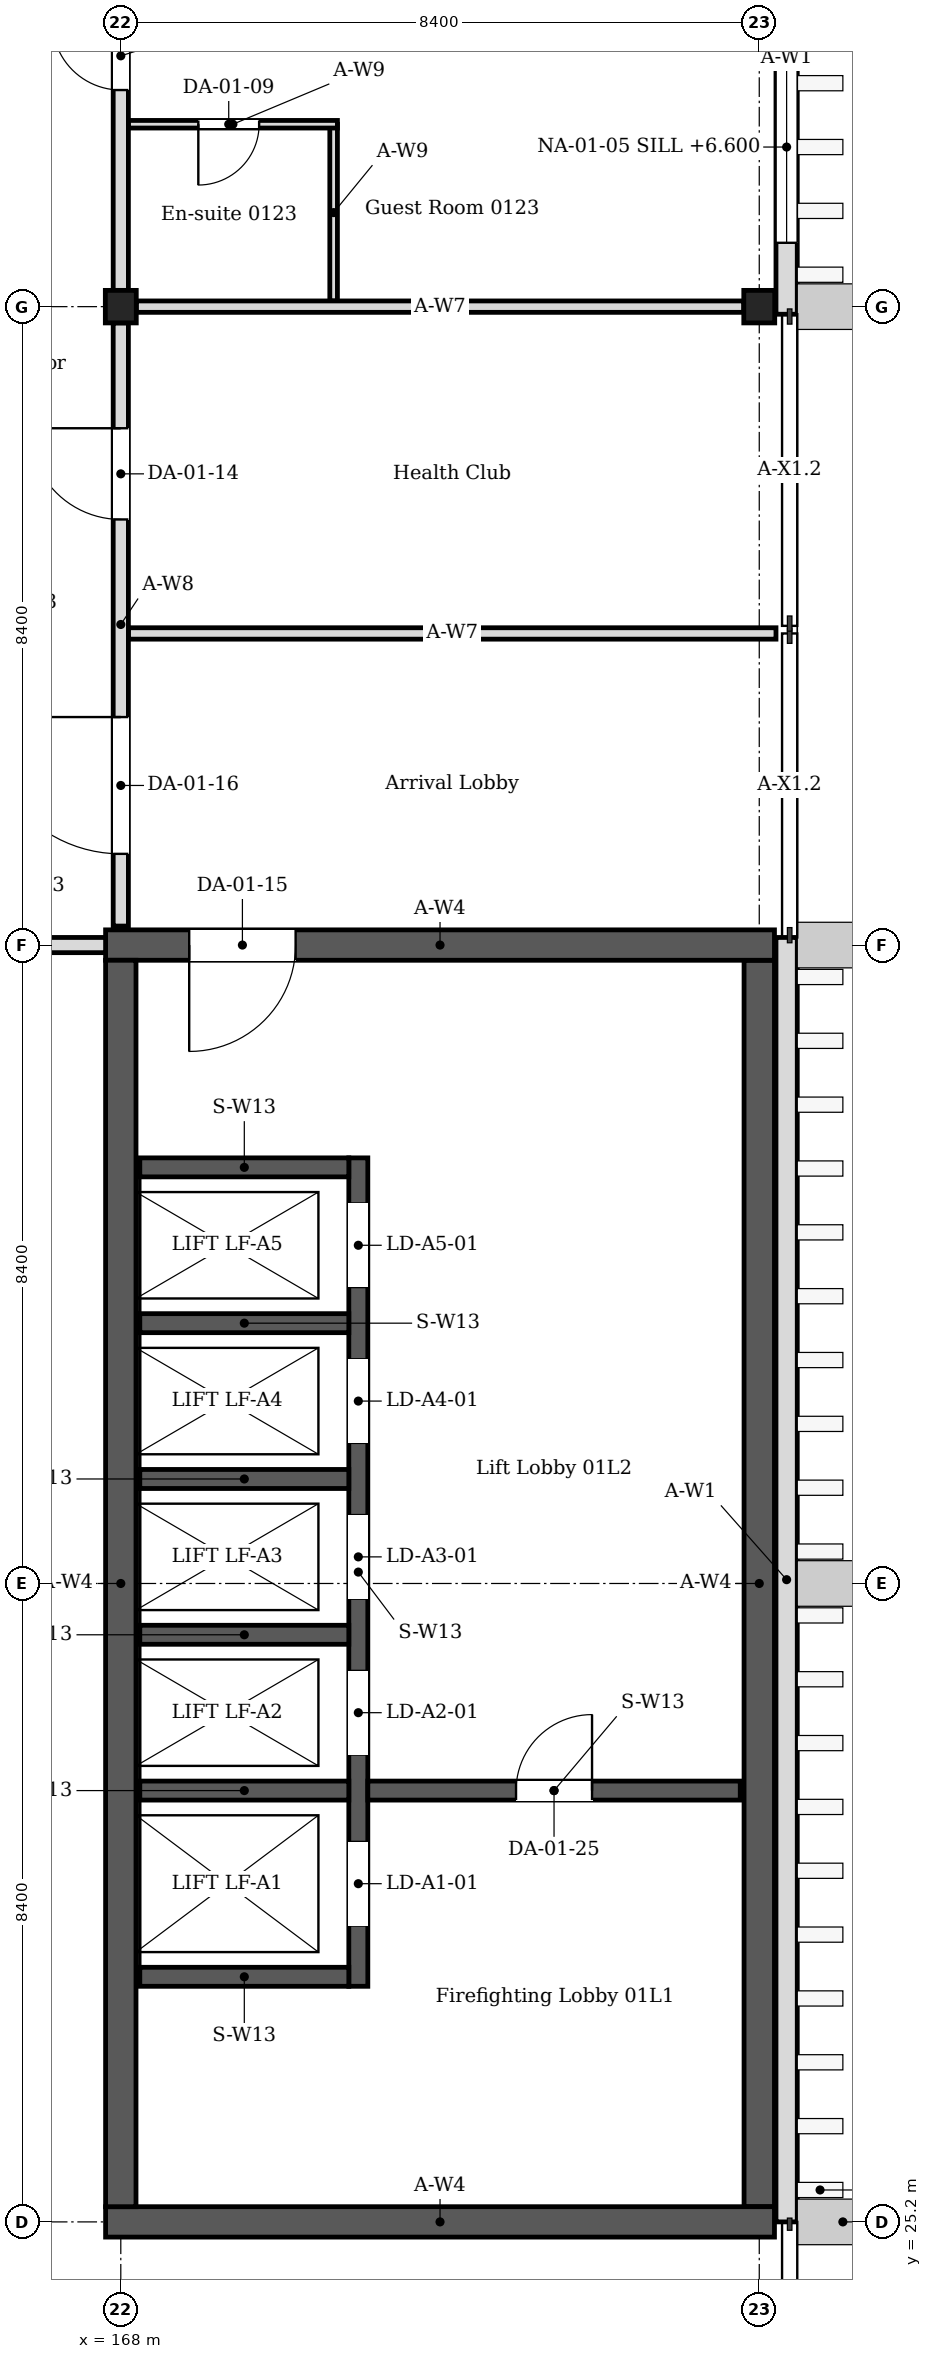
"""IFC4 building model, lengths in metres.
Left out: names, types, materials, properties, quantities, classifications, styles, units other than length and angle.
Written with IfcOpenShell. Run it as: python <this file> out.ifc"""

import sys

from ifc_helpers import new_model, si_unit, direction, frame, frame_2d, origin, origin_2d, place, context, subcontext, project, spatial, rectangle, i_section, extrude, element, fill, save


model = new_model("IFC4")
c1 = context("Model", 3, precision=1e-05, world=origin(), true_north=direction((0.0, 1.0)))
c2 = subcontext(c1, "Body", "Model", "MODEL_VIEW")
j1 = project(units=[si_unit("LENGTHUNIT", "METRE"), si_unit("PLANEANGLEUNIT", "RADIAN")], contexts=[c1])
p1 = place(None, origin())
s1 = spatial("IfcSite", under=j1, at=p1, CompositionType="ELEMENT")
p2 = place(p1, origin())
s2 = spatial("IfcBuilding", under=s1, at=p2, CompositionType="ELEMENT")
p3 = place(p2, frame((0.0, 0.0, 6.0)))
s3 = spatial("IfcBuildingStorey", under=s2, at=p3, CompositionType="ELEMENT", Elevation=6.0)
for number, where, z_axis, x_axis in (
    (1, (168.0, 50.4, 0.0), (0.0, 0.0, 1.0), (1.0, 0.0, 0.0)),
    (2, (176.4, 50.4, 0.0), (0.0, 0.0, 1.0), (1.0, 0.0, 0.0)),
):
    element("IfcColumn", number, at=place(p3, frame(where, z_axis=z_axis, x_axis=x_axis)), inside=s3, PredefinedType="COLUMN", context=c2, shape_type="SweptSolid", body=[
        extrude(i_section(OverallWidth=0.407, OverallDepth=0.428, WebThickness=0.02, FlangeThickness=0.035, FilletRadius=0.022, at=origin_2d()), origin(), (0.0, 0.0, 1.0), 4.2),
    ])
p4 = place(p3, frame((167.8, 25.2, 0.0), z_axis=(0.0, 0.0, 1.0), x_axis=(1.0, 0.0, 0.0)))
e3 = element("IfcWall", 3, at=p4, inside=s3, PredefinedType="SOLIDWALL", context=c2, shape_type="SweptSolid", body=[
    extrude(rectangle(XDim=8.8, YDim=0.4, at=frame_2d((4.4, 0.0))), origin(), (0.0, 0.0, 1.0), 4.05),
])
p5 = place(p3, frame((167.8, 42.0, 0.0), z_axis=(0.0, 0.0, 1.0), x_axis=(1.0, 0.0, 0.0)))
e4 = element("IfcWall", 4, at=p5, inside=s3, PredefinedType="SOLIDWALL", context=c2, shape_type="SweptSolid", body=[
    extrude(rectangle(XDim=8.8, YDim=0.4, at=frame_2d((4.4, 0.0))), origin(), (0.0, 0.0, 1.0), 4.05),
])
p6 = place(p5, frame((1.1, 0.0, 0.0)))
e5 = element("IfcOpeningElement", 5, at=p6, cuts=e4, PredefinedType="OPENING", context=c2, shape_type="SweptSolid", body=[
    extrude(rectangle(XDim=1.4, YDim=2.1, at=frame_2d((0.7, 1.05))), frame((0.0, 0.21, 0.0), z_axis=(0.0, -1.0, 0.0), x_axis=(1.0, 0.0, 0.0)), (0.0, 0.0, 1.0), 0.42),
])
for number, where, z_axis, x_axis in (
    (6, (168.0, 25.4, 0.0), (0.0, 0.0, 1.0), (0.0, 1.0, 0.0)),
    (7, (176.4, 25.4, 0.0), (0.0, 0.0, 1.0), (0.0, 1.0, 0.0)),
):
    element("IfcWall", number, at=place(p3, frame(where, z_axis=z_axis, x_axis=x_axis)), inside=s3, PredefinedType="SOLIDWALL", context=c2, shape_type="SweptSolid", body=[
        extrude(rectangle(XDim=16.4, YDim=0.4, at=frame_2d((8.2, 0.0))), origin(), (0.0, 0.0, 1.0), 4.05),
    ])
p7 = place(p3, frame((176.76, 50.3, 0.0), z_axis=(0.0, 0.0, 1.0), x_axis=(0.0, 1.0, 0.0)))
e8 = element("IfcWall", 8, at=p7, inside=s3, PredefinedType="SOLIDWALL", context=c2, shape_type="SweptSolid", body=[
    extrude(rectangle(XDim=17.12, YDim=0.28, at=frame_2d((8.56, 0.0))), origin(), (0.0, 0.0, 1.0), 4.05),
])
p8 = place(p7, frame((0.94, 0.0, 0.6)))
e9 = element("IfcOpeningElement", 9, at=p8, cuts=e8, PredefinedType="OPENING", context=c2, shape_type="SweptSolid", body=[
    extrude(rectangle(XDim=2.52, YDim=2.4, at=frame_2d((1.26, 1.2))), frame((0.0, 0.15, 0.0), z_axis=(0.0, -1.0, 0.0), x_axis=(1.0, 0.0, 0.0)), (0.0, 0.0, 1.0), 0.3),
])
p9 = place(p7, frame((5.14, 0.0, 0.6)))
e10 = element("IfcOpeningElement", 10, at=p9, cuts=e8, PredefinedType="OPENING", context=c2, shape_type="SweptSolid", body=[
    extrude(rectangle(XDim=2.52, YDim=2.4, at=frame_2d((1.26, 1.2))), frame((0.0, 0.15, 0.0), z_axis=(0.0, -1.0, 0.0), x_axis=(1.0, 0.0, 0.0)), (0.0, 0.0, 1.0), 0.3),
])
p10 = place(p3, frame((176.76, 25.2, 0.0), z_axis=(0.0, 0.0, 1.0), x_axis=(0.0, 1.0, 0.0)))
e11 = element("IfcWall", 11, at=p10, inside=s3, PredefinedType="SOLIDWALL", context=c2, shape_type="SweptSolid", body=[
    extrude(rectangle(XDim=16.9, YDim=0.28, at=frame_2d((8.45, 0.0))), origin(), (0.0, 0.0, 1.0), 4.05),
])
p11 = place(p3, frame((168.1, 46.1, 0.0), z_axis=(0.0, 0.0, 1.0), x_axis=(1.0, 0.0, 0.0)))
e12 = element("IfcWall", 12, at=p11, inside=s3, PredefinedType="PARTITIONING", context=c2, shape_type="SweptSolid", body=[
    extrude(rectangle(XDim=8.52, YDim=0.15, at=frame_2d((4.26, 0.0))), origin(), (0.0, 0.0, 1.0), 3.604),
])
p12 = place(p3, frame((170.8, 50.475, 0.0), z_axis=(0.0, 0.0, 1.0), x_axis=(0.0, 1.0, 0.0)))
e13 = element("IfcWall", 13, at=p12, inside=s3, PredefinedType="PARTITIONING", context=c2, shape_type="SweptSolid", body=[
    extrude(rectangle(XDim=2.325, YDim=0.1, at=frame_2d((1.163, 0.0))), origin(), (0.0, 0.0, 1.0), 4.05),
])
p13 = place(p3, frame((170.85, 52.8, 0.0), z_axis=(0.0, 0.0, 1.0), x_axis=(-1.0, 0.0, 0.0)))
e14 = element("IfcWall", 14, at=p13, inside=s3, PredefinedType="PARTITIONING", context=c2, shape_type="SweptSolid", body=[
    extrude(rectangle(XDim=2.75, YDim=0.1, at=frame_2d((1.375, 0.0))), origin(), (0.0, 0.0, 1.0), 4.05),
])
p14 = place(p13, frame((1.03, 0.0, 0.0)))
e15 = element("IfcOpeningElement", 15, at=p14, cuts=e14, PredefinedType="OPENING", context=c2, shape_type="SweptSolid", body=[
    extrude(rectangle(XDim=0.8, YDim=2.1, at=frame_2d((0.4, 1.05))), frame((0.0, 0.06, 0.0), z_axis=(0.0, -1.0, 0.0), x_axis=(1.0, 0.0, 0.0)), (0.0, 0.0, 1.0), 0.12),
])
p15 = place(p3, frame((168.204, 50.4, 0.0), z_axis=(0.0, 0.0, 1.0), x_axis=(1.0, 0.0, 0.0)))
e16 = element("IfcWall", 16, at=p15, inside=s3, PredefinedType="PARTITIONING", context=c2, shape_type="SweptSolid", body=[
    extrude(rectangle(XDim=7.993, YDim=0.15, at=frame_2d((3.997, 0.0))), origin(), (0.0, 0.0, 1.0), 3.604),
])
p16 = place(p3, frame((165.803, 42.0, 0.0), z_axis=(0.0, 0.0, 1.0), x_axis=(1.0, 0.0, 0.0)))
e17 = element("IfcWall", 17, at=p16, inside=s3, PredefinedType="PARTITIONING", context=c2, shape_type="SweptSolid", body=[
    extrude(rectangle(XDim=1.997, YDim=0.2, at=frame_2d((0.998, 0.0))), origin(), (0.0, 0.0, 1.0), 3.604),
])
p17 = place(p3, frame((168.0, 42.25, 0.0), z_axis=(0.0, 0.0, 1.0), x_axis=(0.0, 1.0, 0.0)))
e18 = element("IfcWall", 18, at=p17, inside=s3, PredefinedType="PARTITIONING", context=c2, shape_type="SweptSolid", body=[
    extrude(rectangle(XDim=7.936, YDim=0.2, at=frame_2d((3.968, 0.0))), origin(), (0.0, 0.0, 1.0), 3.45),
])
p18 = place(p17, frame((5.35, 0.0, 0.0)))
e19 = element("IfcOpeningElement", 19, at=p18, cuts=e18, PredefinedType="OPENING", context=c2, shape_type="SweptSolid", body=[
    extrude(rectangle(XDim=1.2, YDim=2.1, at=frame_2d((0.6, 1.05))), frame((0.0, 0.11, 0.0), z_axis=(0.0, -1.0, 0.0), x_axis=(1.0, 0.0, 0.0)), (0.0, 0.0, 1.0), 0.22),
])
p19 = place(p17, frame((0.95, 0.0, 0.0)))
e20 = element("IfcOpeningElement", 20, at=p19, cuts=e18, PredefinedType="OPENING", context=c2, shape_type="SweptSolid", body=[
    extrude(rectangle(XDim=1.8, YDim=2.1, at=frame_2d((0.9, 1.05))), frame((0.0, 0.11, 0.0), z_axis=(0.0, -1.0, 0.0), x_axis=(1.0, 0.0, 0.0)), (0.0, 0.0, 1.0), 0.22),
])
p20 = place(p3, frame((168.0, 50.614, 0.0), z_axis=(0.0, 0.0, 1.0), x_axis=(0.0, 1.0, 0.0)))
e21 = element("IfcWall", 21, at=p20, inside=s3, PredefinedType="PARTITIONING", context=c2, shape_type="SweptSolid", body=[
    extrude(rectangle(XDim=7.986, YDim=0.2, at=frame_2d((3.993, 0.0))), origin(), (0.0, 0.0, 1.0), 3.45),
])
p21 = place(p20, frame((2.636, 0.0, 0.0)))
e22 = element("IfcOpeningElement", 22, at=p21, cuts=e21, PredefinedType="OPENING", context=c2, shape_type="SweptSolid", body=[
    extrude(rectangle(XDim=0.9, YDim=2.1, at=frame_2d((0.45, 1.05))), frame((0.0, 0.11, 0.0), z_axis=(0.0, -1.0, 0.0), x_axis=(1.0, 0.0, 0.0)), (0.0, 0.0, 1.0), 0.22),
])
p22 = place(p20, frame((4.436, 0.0, 0.0)))
e23 = element("IfcOpeningElement", 23, at=p22, cuts=e21, PredefinedType="OPENING", context=c2, shape_type="SweptSolid", body=[
    extrude(rectangle(XDim=0.9, YDim=2.1, at=frame_2d((0.45, 1.05))), frame((0.0, 0.11, 0.0), z_axis=(0.0, -1.0, 0.0), x_axis=(1.0, 0.0, 0.0)), (0.0, 0.0, 1.0), 0.22),
])
p23 = place(p3, frame((171.125, 28.3, 0.0), z_axis=(0.0, 0.0, 1.0), x_axis=(0.0, 1.0, 0.0)))
e24 = element("IfcWall", 24, at=p23, inside=s3, PredefinedType="SOLIDWALL", context=c2, shape_type="SweptSolid", body=[
    extrude(rectangle(XDim=10.9, YDim=0.25, at=frame_2d((5.45, 0.0))), origin(), (0.0, 0.0, 1.0), 4.05),
])
p24 = place(p23, frame((0.8, 0.0, 0.0)))
e25 = element("IfcOpeningElement", 25, at=p24, cuts=e24, PredefinedType="OPENING", context=c2, shape_type="SweptSolid", body=[
    extrude(rectangle(XDim=1.1, YDim=2.1, at=frame_2d((0.55, 1.05))), frame((0.0, 0.135, 0.0), z_axis=(0.0, -1.0, 0.0), x_axis=(1.0, 0.0, 0.0)), (0.0, 0.0, 1.0), 0.27),
])
p25 = place(p23, frame((3.05, 0.0, 0.0)))
e26 = element("IfcOpeningElement", 26, at=p25, cuts=e24, PredefinedType="OPENING", context=c2, shape_type="SweptSolid", body=[
    extrude(rectangle(XDim=1.1, YDim=2.1, at=frame_2d((0.55, 1.05))), frame((0.0, 0.135, 0.0), z_axis=(0.0, -1.0, 0.0), x_axis=(1.0, 0.0, 0.0)), (0.0, 0.0, 1.0), 0.27),
])
p26 = place(p23, frame((5.1, 0.0, 0.0)))
e27 = element("IfcOpeningElement", 27, at=p26, cuts=e24, PredefinedType="OPENING", context=c2, shape_type="SweptSolid", body=[
    extrude(rectangle(XDim=1.1, YDim=2.1, at=frame_2d((0.55, 1.05))), frame((0.0, 0.135, 0.0), z_axis=(0.0, -1.0, 0.0), x_axis=(1.0, 0.0, 0.0)), (0.0, 0.0, 1.0), 0.27),
])
p27 = place(p23, frame((7.15, 0.0, 0.0)))
e28 = element("IfcOpeningElement", 28, at=p27, cuts=e24, PredefinedType="OPENING", context=c2, shape_type="SweptSolid", body=[
    extrude(rectangle(XDim=1.1, YDim=2.1, at=frame_2d((0.55, 1.05))), frame((0.0, 0.135, 0.0), z_axis=(0.0, -1.0, 0.0), x_axis=(1.0, 0.0, 0.0)), (0.0, 0.0, 1.0), 0.27),
])
p28 = place(p23, frame((9.2, 0.0, 0.0)))
e29 = element("IfcOpeningElement", 29, at=p28, cuts=e24, PredefinedType="OPENING", context=c2, shape_type="SweptSolid", body=[
    extrude(rectangle(XDim=1.1, YDim=2.1, at=frame_2d((0.55, 1.05))), frame((0.0, 0.135, 0.0), z_axis=(0.0, -1.0, 0.0), x_axis=(1.0, 0.0, 0.0)), (0.0, 0.0, 1.0), 0.27),
])
for number, where, z_axis, x_axis in (
    (30, (168.25, 28.425, 0.0), (0.0, 0.0, 1.0), (1.0, 0.0, 0.0)),
    (31, (168.25, 30.875, 0.0), (0.0, 0.0, 1.0), (1.0, 0.0, 0.0)),
    (32, (168.25, 32.925, 0.0), (0.0, 0.0, 1.0), (1.0, 0.0, 0.0)),
    (33, (168.25, 34.975, 0.0), (0.0, 0.0, 1.0), (1.0, 0.0, 0.0)),
    (34, (168.25, 37.025, 0.0), (0.0, 0.0, 1.0), (1.0, 0.0, 0.0)),
    (35, (168.25, 39.075, 0.0), (0.0, 0.0, 1.0), (1.0, 0.0, 0.0)),
):
    element("IfcWall", number, at=place(p3, frame(where, z_axis=z_axis, x_axis=x_axis)), inside=s3, PredefinedType="SOLIDWALL", context=c2, shape_type="SweptSolid", body=[
        extrude(rectangle(XDim=2.75, YDim=0.25, at=frame_2d((1.375, 0.0))), origin(), (0.0, 0.0, 1.0), 4.05),
    ])
p29 = place(p3, frame((171.25, 30.875, 0.0), z_axis=(0.0, 0.0, 1.0), x_axis=(1.0, 0.0, 0.0)))
e36 = element("IfcWall", 36, at=p29, inside=s3, PredefinedType="SOLIDWALL", context=c2, shape_type="SweptSolid", body=[
    extrude(rectangle(XDim=4.9, YDim=0.25, at=frame_2d((2.45, 0.0))), origin(), (0.0, 0.0, 1.0), 4.05),
])
p30 = place(p29, frame((1.95, 0.0, 0.0)))
e37 = element("IfcOpeningElement", 37, at=p30, cuts=e36, PredefinedType="OPENING", context=c2, shape_type="SweptSolid", body=[
    extrude(rectangle(XDim=1.0, YDim=2.1, at=frame_2d((0.5, 1.05))), frame((0.0, 0.135, 0.0), z_axis=(0.0, -1.0, 0.0), x_axis=(1.0, 0.0, 0.0)), (0.0, 0.0, 1.0), 0.27),
])
p31 = place(p8, origin())
e38 = element("IfcWindow", 38, at=p31, inside=s3, PartitioningType="SINGLE_PANEL", PredefinedType="WINDOW", context=c2, shape_type="SweptSolid", body=[
    extrude(rectangle(XDim=2.52, YDim=2.4, at=frame_2d((1.26, 1.2))), frame((0.0, 0.03, 0.0), z_axis=(0.0, -1.0, 0.0), x_axis=(1.0, 0.0, 0.0)), (0.0, 0.0, 1.0), 0.06),
])
fill(e9, e38)
p32 = place(p14, origin())
e39 = element("IfcDoor", 39, at=p32, inside=s3, OperationType="SINGLE_SWING_RIGHT", PredefinedType="DOOR", context=c2, shape_type="SweptSolid", body=[
    extrude(rectangle(XDim=0.8, YDim=2.1, at=frame_2d((0.4, 1.05))), frame((0.0, 0.025, 0.0), z_axis=(0.0, -1.0, 0.0), x_axis=(1.0, 0.0, 0.0)), (0.0, 0.0, 1.0), 0.05),
])
fill(e15, e39)
p33 = place(p21, origin())
e40 = element("IfcDoor", 40, at=p33, inside=s3, OperationType="SINGLE_SWING_RIGHT", PredefinedType="DOOR", context=c2, shape_type="SweptSolid", body=[
    extrude(rectangle(XDim=0.9, YDim=2.1, at=frame_2d((0.45, 1.05))), frame((0.0, 0.025, 0.0), z_axis=(0.0, -1.0, 0.0), x_axis=(1.0, 0.0, 0.0)), (0.0, 0.0, 1.0), 0.05),
])
fill(e22, e40)
p34 = place(p18, origin())
e41 = element("IfcDoor", 41, at=p34, inside=s3, OperationType="SINGLE_SWING_RIGHT", PredefinedType="DOOR", context=c2, shape_type="SweptSolid", body=[
    extrude(rectangle(XDim=1.2, YDim=2.1, at=frame_2d((0.6, 1.05))), frame((0.0, 0.025, 0.0), z_axis=(0.0, -1.0, 0.0), x_axis=(1.0, 0.0, 0.0)), (0.0, 0.0, 1.0), 0.05),
])
fill(e19, e41)
p35 = place(p6, origin())
e42 = element("IfcDoor", 42, at=p35, inside=s3, OperationType="DOUBLE_DOOR_DOUBLE_SWING", PredefinedType="DOOR", context=c2, shape_type="SweptSolid", body=[
    extrude(rectangle(XDim=1.4, YDim=2.1, at=frame_2d((0.7, 1.05))), frame((0.0, 0.025, 0.0), z_axis=(0.0, -1.0, 0.0), x_axis=(1.0, 0.0, 0.0)), (0.0, 0.0, 1.0), 0.05),
])
fill(e5, e42)
p36 = place(p19, origin())
e43 = element("IfcDoor", 43, at=p36, inside=s3, OperationType="DOUBLE_DOOR_DOUBLE_SWING", PredefinedType="DOOR", context=c2, shape_type="SweptSolid", body=[
    extrude(rectangle(XDim=1.8, YDim=2.1, at=frame_2d((0.9, 1.05))), frame((0.0, 0.025, 0.0), z_axis=(0.0, -1.0, 0.0), x_axis=(1.0, 0.0, 0.0)), (0.0, 0.0, 1.0), 0.05),
])
fill(e20, e43)
p37 = place(p24, origin())
e44 = element("IfcDoor", 44, at=p37, inside=s3, OperationType="SLIDING_TO_LEFT", PredefinedType="DOOR", context=c2, shape_type="SweptSolid", body=[
    extrude(rectangle(XDim=1.1, YDim=2.1, at=frame_2d((0.55, 1.05))), frame((0.0, 0.025, 0.0), z_axis=(0.0, -1.0, 0.0), x_axis=(1.0, 0.0, 0.0)), (0.0, 0.0, 1.0), 0.05),
])
fill(e25, e44)
p38 = place(p25, origin())
e45 = element("IfcDoor", 45, at=p38, inside=s3, OperationType="SLIDING_TO_LEFT", PredefinedType="DOOR", context=c2, shape_type="SweptSolid", body=[
    extrude(rectangle(XDim=1.1, YDim=2.1, at=frame_2d((0.55, 1.05))), frame((0.0, 0.025, 0.0), z_axis=(0.0, -1.0, 0.0), x_axis=(1.0, 0.0, 0.0)), (0.0, 0.0, 1.0), 0.05),
])
fill(e26, e45)
p39 = place(p26, origin())
e46 = element("IfcDoor", 46, at=p39, inside=s3, OperationType="SLIDING_TO_LEFT", PredefinedType="DOOR", context=c2, shape_type="SweptSolid", body=[
    extrude(rectangle(XDim=1.1, YDim=2.1, at=frame_2d((0.55, 1.05))), frame((0.0, 0.025, 0.0), z_axis=(0.0, -1.0, 0.0), x_axis=(1.0, 0.0, 0.0)), (0.0, 0.0, 1.0), 0.05),
])
fill(e27, e46)
p40 = place(p27, origin())
e47 = element("IfcDoor", 47, at=p40, inside=s3, OperationType="SLIDING_TO_LEFT", PredefinedType="DOOR", context=c2, shape_type="SweptSolid", body=[
    extrude(rectangle(XDim=1.1, YDim=2.1, at=frame_2d((0.55, 1.05))), frame((0.0, 0.025, 0.0), z_axis=(0.0, -1.0, 0.0), x_axis=(1.0, 0.0, 0.0)), (0.0, 0.0, 1.0), 0.05),
])
fill(e28, e47)
p41 = place(p28, origin())
e48 = element("IfcDoor", 48, at=p41, inside=s3, OperationType="SLIDING_TO_LEFT", PredefinedType="DOOR", context=c2, shape_type="SweptSolid", body=[
    extrude(rectangle(XDim=1.1, YDim=2.1, at=frame_2d((0.55, 1.05))), frame((0.0, 0.025, 0.0), z_axis=(0.0, -1.0, 0.0), x_axis=(1.0, 0.0, 0.0)), (0.0, 0.0, 1.0), 0.05),
])
fill(e29, e48)
p42 = place(p30, origin())
e49 = element("IfcDoor", 49, at=p42, inside=s3, OperationType="SINGLE_SWING_RIGHT", PredefinedType="DOOR", context=c2, shape_type="SweptSolid", body=[
    extrude(rectangle(XDim=1.0, YDim=2.1, at=frame_2d((0.5, 1.05))), frame((0.0, 0.025, 0.0), z_axis=(0.0, -1.0, 0.0), x_axis=(1.0, 0.0, 0.0)), (0.0, 0.0, 1.0), 0.05),
])
fill(e37, e49)
save(model, sys.argv[1])
